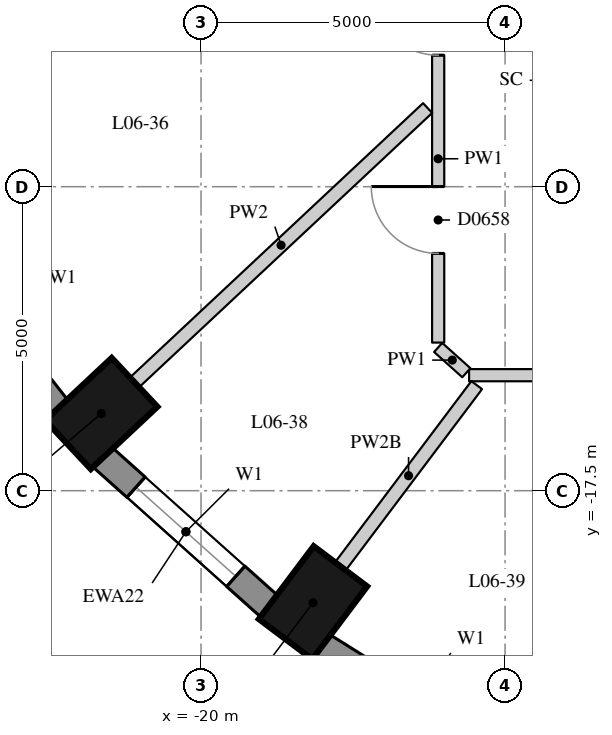
"""IFC4 building model, lengths in metres.
Left out: names, types, materials, properties, quantities, classifications, styles, units other than length and angle.
Written with IfcOpenShell. Run it as: python <this file> out.ifc"""

import sys

from ifc_helpers import new_model, si_unit, direction, frame, frame_2d, origin, origin_2d, place, context, subcontext, project, spatial, rectangle, extrude, element, fill, save


model = new_model("IFC4")
c1 = context("Model", 3, precision=1e-05, world=origin(), true_north=direction((0.0, 1.0)))
c2 = subcontext(c1, "Body", "Model", "MODEL_VIEW")
j1 = project(units=[si_unit("LENGTHUNIT", "METRE"), si_unit("PLANEANGLEUNIT", "RADIAN")], contexts=[c1])
p1 = place(None, origin())
s1 = spatial("IfcSite", under=j1, at=p1, CompositionType="ELEMENT")
p2 = place(p1, origin())
s2 = spatial("IfcBuilding", under=s1, at=p2, CompositionType="ELEMENT")
p3 = place(p2, frame((0.0, 0.0, 28.3)))
s3 = spatial("IfcBuildingStorey", under=s2, at=p3, CompositionType="ELEMENT", Elevation=28.3)
for number, where, z_axis, x_axis in (
    (1, (-21.641, -16.23, 0.0), (0.0, 0.0, 1.0), (-0.73, -0.683, 0.0)),
    (2, (-18.159, -19.343, 0.0), (0.0, 0.0, 1.0), (-0.601, -0.799, 0.0)),
):
    element("IfcColumn", number, at=place(p3, frame(where, z_axis=z_axis, x_axis=x_axis)), inside=s3, PredefinedType="COLUMN", context=c2, shape_type="SweptSolid", body=[
        extrude(rectangle(XDim=1.5, YDim=1.1, at=origin_2d()), origin(), (0.0, 0.0, 1.0), 3.3),
    ])
p4 = place(p3, frame((-24.578, -13.328, 0.0), z_axis=(0.0, 0.0, 1.0), x_axis=(0.616661975264, -0.787228053529, 0.0)))
e3 = element("IfcWall", 3, at=p4, inside=s3, PredefinedType="SOLIDWALL", context=c2, shape_type="SweptSolid", body=[
    extrude(rectangle(XDim=3.61, YDim=0.45, at=frame_2d((1.805, 0.0))), origin(), (0.0, 0.0, 1.0), 3.02),
])
p5 = place(p4, frame((0.705, 0.0, 0.4)))
e4 = element("IfcOpeningElement", 4, at=p5, cuts=e3, PredefinedType="OPENING", context=c2, shape_type="SweptSolid", body=[
    extrude(rectangle(XDim=2.2, YDim=1.75, at=frame_2d((1.1, 0.875))), frame((0.0, 0.235, 0.0), z_axis=(0.0, -1.0, 0.0), x_axis=(1.0, 0.0, 0.0)), (0.0, 0.0, 1.0), 0.47),
])
p6 = place(p3, frame((-21.627, -16.943, 0.0), z_axis=(0.0, 0.0, 1.0), x_axis=(0.745526233716, -0.66647628228, 0.0)))
e5 = element("IfcWall", 5, at=p6, inside=s3, PredefinedType="SOLIDWALL", context=c2, shape_type="SweptSolid", body=[
    extrude(rectangle(XDim=3.697, YDim=0.45, at=frame_2d((1.848, 0.0))), origin(), (0.0, 0.0, 1.0), 3.02),
])
p7 = place(p6, frame((0.749, 0.0, 0.4)))
e6 = element("IfcOpeningElement", 6, at=p7, cuts=e5, PredefinedType="OPENING", context=c2, shape_type="SweptSolid", body=[
    extrude(rectangle(XDim=2.2, YDim=1.75, at=frame_2d((1.1, 0.875))), frame((0.0, 0.235, 0.0), z_axis=(0.0, -1.0, 0.0), x_axis=(1.0, 0.0, 0.0)), (0.0, 0.0, 1.0), 0.47),
])
p8 = place(p3, frame((-18.023, -20.044, 0.0), z_axis=(0.0, 0.0, 1.0), x_axis=(0.847635480093, -0.530579016629, 0.0)))
e7 = element("IfcWall", 7, at=p8, inside=s3, PredefinedType="SOLIDWALL", context=c2, shape_type="SweptSolid", body=[
    extrude(rectangle(XDim=3.782, YDim=0.45, at=frame_2d((1.891, 0.0))), origin(), (0.0, 0.0, 1.0), 3.02),
])
p9 = place(p8, frame((0.791, 0.0, 0.4)))
e8 = element("IfcOpeningElement", 8, at=p9, cuts=e7, PredefinedType="OPENING", context=c2, shape_type="SweptSolid", body=[
    extrude(rectangle(XDim=2.2, YDim=1.75, at=frame_2d((1.1, 0.875))), frame((0.0, 0.235, 0.0), z_axis=(0.0, -1.0, 0.0), x_axis=(1.0, 0.0, 0.0)), (0.0, 0.0, 1.0), 0.47),
])
p10 = place(p3, frame((-7.92, -15.6, 0.0), z_axis=(0.0, 0.0, 1.0), x_axis=(-1.0, 0.0, 0.0)))
e9 = element("IfcWall", 9, at=p10, inside=s3, PredefinedType="PARTITIONING", context=c2, shape_type="SweptSolid", body=[
    extrude(rectangle(XDim=7.672, YDim=0.2, at=frame_2d((3.836, 0.0))), origin(), (0.0, 0.0, 1.0), 3.02),
])
p11 = place(p10, frame((5.537, 0.0, 0.0)))
e10 = element("IfcOpeningElement", 10, at=p11, cuts=e9, PredefinedType="OPENING", context=c2, shape_type="SweptSolid", body=[
    extrude(rectangle(XDim=1.0, YDim=2.1, at=frame_2d((0.5, 1.05))), frame((0.0, 0.11, 0.0), z_axis=(0.0, -1.0, 0.0), x_axis=(1.0, 0.0, 0.0)), (0.0, 0.0, 1.0), 0.22),
])
p12 = place(p10, frame((1.036, 0.0, 0.0)))
e11 = element("IfcOpeningElement", 11, at=p12, cuts=e9, PredefinedType="OPENING", context=c2, shape_type="SweptSolid", body=[
    extrude(rectangle(XDim=0.9, YDim=2.1, at=frame_2d((0.45, 1.05))), frame((0.0, 0.11, 0.0), z_axis=(0.0, -1.0, 0.0), x_axis=(1.0, 0.0, 0.0)), (0.0, 0.0, 1.0), 0.22),
])
p13 = place(p3, frame((-15.636, -15.56, 0.0), z_axis=(0.0, 0.0, 1.0), x_axis=(-0.744656758283, 0.667447610187, 0.0)))
e12 = element("IfcWall", 12, at=p13, inside=s3, PredefinedType="PARTITIONING", context=c2, shape_type="SweptSolid", body=[
    extrude(rectangle(XDim=0.623, YDim=0.2, at=frame_2d((0.312, 0.0))), origin(), (0.0, 0.0, 1.0), 3.02),
])
p14 = place(p3, frame((-16.1, -15.064, 0.0), z_axis=(0.0, 0.0, 1.0), x_axis=(0.0, 1.0, 0.0)))
e13 = element("IfcWall", 13, at=p14, inside=s3, PredefinedType="PARTITIONING", context=c2, shape_type="SweptSolid", body=[
    extrude(rectangle(XDim=6.047, YDim=0.2, at=frame_2d((3.023, 0.0))), origin(), (0.0, 0.0, 1.0), 3.02),
])
p15 = place(p14, frame((4.727, 0.0, 0.0)))
e14 = element("IfcOpeningElement", 14, at=p15, cuts=e13, PredefinedType="OPENING", context=c2, shape_type="SweptSolid", body=[
    extrude(rectangle(XDim=1.1, YDim=2.1, at=frame_2d((0.55, 1.05))), frame((0.0, 0.11, 0.0), z_axis=(0.0, -1.0, 0.0), x_axis=(1.0, 0.0, 0.0)), (0.0, 0.0, 1.0), 0.22),
])
p16 = place(p14, frame((1.467, 0.0, 0.0)))
e15 = element("IfcOpeningElement", 15, at=p16, cuts=e13, PredefinedType="OPENING", context=c2, shape_type="SweptSolid", body=[
    extrude(rectangle(XDim=1.1, YDim=2.1, at=frame_2d((0.55, 1.05))), frame((0.0, 0.11, 0.0), z_axis=(0.0, -1.0, 0.0), x_axis=(1.0, 0.0, 0.0)), (0.0, 0.0, 1.0), 0.22),
])
p17 = place(p3, frame((-21.093, -15.718, 0.0), z_axis=(0.0, 0.0, 1.0), x_axis=(0.73009284205, 0.683347965525, 0.0)))
e16 = element("IfcWall", 16, at=p17, inside=s3, PredefinedType="PARTITIONING", context=c2, shape_type="SweptSolid", body=[
    extrude(rectangle(XDim=6.602, YDim=0.22, at=frame_2d((3.301, 0.0))), origin(), (0.0, 0.0, 1.0), 3.02),
])
p18 = place(p3, frame((-17.708, -18.743, 0.0), z_axis=(0.0, 0.0, 1.0), x_axis=(0.601172757903, 0.799119086967, 0.0)))
e17 = element("IfcWall", 17, at=p18, inside=s3, PredefinedType="PARTITIONING", context=c2, shape_type="SweptSolid", body=[
    extrude(rectangle(XDim=3.729, YDim=0.22, at=frame_2d((1.864, 0.0))), origin(), (0.0, 0.0, 1.0), 2.57),
])
p19 = place(p7, origin())
e18 = element("IfcWindow", 18, at=p19, inside=s3, PartitioningType="SINGLE_PANEL", PredefinedType="WINDOW", context=c2, shape_type="SweptSolid", body=[
    extrude(rectangle(XDim=2.2, YDim=1.75, at=frame_2d((1.1, 0.875))), frame((0.0, 0.035, 0.0), z_axis=(0.0, -1.0, 0.0), x_axis=(1.0, 0.0, 0.0)), (0.0, 0.0, 1.0), 0.06),
])
fill(e6, e18)
p20 = place(p15, origin())
e19 = element("IfcDoor", 19, at=p20, inside=s3, OperationType="SINGLE_SWING_RIGHT", PredefinedType="DOOR", context=c2, shape_type="SweptSolid", body=[
    extrude(rectangle(XDim=1.1, YDim=2.1, at=frame_2d((0.55, 1.05))), frame((0.0, 0.025, 0.0), z_axis=(0.0, -1.0, 0.0), x_axis=(1.0, 0.0, 0.0)), (0.0, 0.0, 1.0), 0.05),
])
fill(e14, e19)
p21 = place(p16, origin())
e20 = element("IfcDoor", 20, at=p21, inside=s3, OperationType="SINGLE_SWING_RIGHT", PredefinedType="DOOR", context=c2, shape_type="SweptSolid", body=[
    extrude(rectangle(XDim=1.1, YDim=2.1, at=frame_2d((0.55, 1.05))), frame((0.0, 0.025, 0.0), z_axis=(0.0, -1.0, 0.0), x_axis=(1.0, 0.0, 0.0)), (0.0, 0.0, 1.0), 0.05),
])
fill(e15, e20)
save(model, sys.argv[1])
